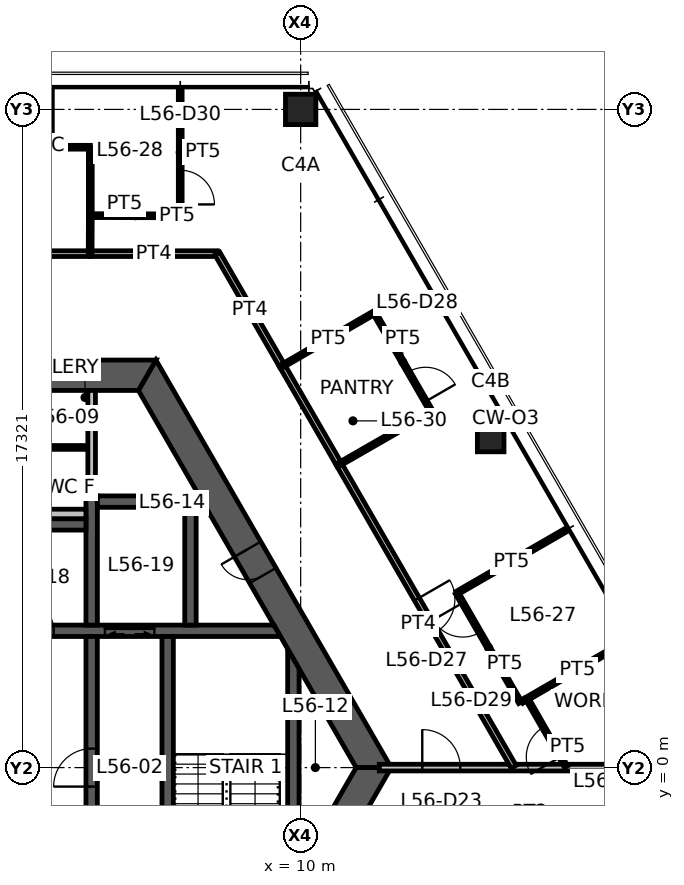
"""IFC4 building model, lengths in metres.
Left out: names, types, materials, properties, quantities, classifications, styles, units other than length and angle.
Written with IfcOpenShell. Run it as: python <this file> out.ifc"""

import sys

from ifc_helpers import new_model, si_unit, direction, frame, frame_2d, origin, origin_2d, place, context, subcontext, project, spatial, polyline, rectangle, hollow_rectangle, outline, extrude, element, fill, save


model = new_model("IFC4")
c1 = context("Model", 3, precision=1e-05, world=origin(), true_north=direction((0.0, 1.0)))
c2 = subcontext(c1, "Body", "Model", "MODEL_VIEW")
j1 = project(units=[si_unit("LENGTHUNIT", "METRE"), si_unit("PLANEANGLEUNIT", "RADIAN")], contexts=[c1])
p1 = place(None, origin())
s1 = spatial("IfcSite", under=j1, at=p1, CompositionType="ELEMENT")
p2 = place(p1, origin())
s2 = spatial("IfcBuilding", under=s1, at=p2, CompositionType="ELEMENT")
p3 = place(p2, frame((0.0, 0.0, 224.5)))
s3 = spatial("IfcBuildingStorey", under=s2, at=p3, CompositionType="ELEMENT", Elevation=224.5)
p4 = place(p3, frame((10.0, 17.321, 0.0), z_axis=(0.0, 0.0, 1.0), x_axis=(1.0, 0.0, 0.0)))
e1 = element("IfcColumn", 1, at=p4, inside=s3, PredefinedType="COLUMN", context=c2, shape_type="SweptSolid", body=[
    extrude(hollow_rectangle(XDim=0.8, YDim=0.8, WallThickness=0.04, at=origin_2d()), origin(), (0.0, 0.0, 1.0), 3.9),
])
p5 = place(p3, frame((15.0, 8.66, 0.0), z_axis=(0.0, 0.0, 1.0), x_axis=(1.0, 0.0, 0.0)))
e2 = element("IfcColumn", 2, at=p5, inside=s3, PredefinedType="COLUMN", context=c2, shape_type="SweptSolid", body=[
    extrude(hollow_rectangle(XDim=0.7, YDim=0.7, WallThickness=0.032, at=origin_2d()), origin(), (0.0, 0.0, 1.0), 3.9),
])
p6 = place(p3, frame((11.922, 0.0, 0.0), z_axis=(0.0, 0.0, 1.0), x_axis=(-0.500004296715, 0.866022923061, 0.0)))
e3 = element("IfcWall", 3, at=p6, inside=s3, PredefinedType="SHEAR", context=c2, shape_type="SweptSolid", body=[
    extrude(outline(polyline([(-0.231, -0.4), (5.835, -0.4), (6.635, -0.4), (12.153, -0.4), (11.691, 0.4), (6.635, 0.4), (5.835, 0.4), (0.231, 0.4), (-0.231, -0.4)])), origin(), (0.0, 0.0, 1.0), 3.9),
])
p7 = place(p6, frame((5.835, 0.0, 0.0)))
e4 = element("IfcOpeningElement", 4, at=p7, cuts=e3, PredefinedType="OPENING", context=c2, shape_type="SweptSolid", body=[
    extrude(rectangle(XDim=0.8, YDim=2.1, at=frame_2d((0.4, 1.05))), frame((0.0, 0.41, 0.0), z_axis=(0.0, -1.0, 0.0), x_axis=(1.0, 0.0, 0.0)), (0.0, 0.0, 1.0), 0.82),
])
p8 = place(p3, frame((5.961, 10.325, 0.0), z_axis=(0.0, 0.0, 1.0), x_axis=(-1.0, 0.0, 0.0)))
e5 = element("IfcWall", 5, at=p8, inside=s3, PredefinedType="SHEAR", context=c2, shape_type="SweptSolid", body=[
    extrude(outline(polyline([(-0.231, -0.4), (4.636, -0.4), (5.536, -0.4), (6.386, -0.4), (7.286, -0.4), (12.153, -0.4), (11.691, 0.4), (7.286, 0.4), (6.386, 0.4), (5.536, 0.4), (4.636, 0.4), (0.231, 0.4), (-0.231, -0.4)])), origin(), (0.0, 0.0, 1.0), 3.9),
])
p9 = place(p8, frame((6.386, 0.0, 0.0)))
e6 = element("IfcOpeningElement", 6, at=p9, cuts=e5, PredefinedType="OPENING", context=c2, shape_type="SweptSolid", body=[
    extrude(rectangle(XDim=0.9, YDim=2.1, at=frame_2d((0.45, 1.05))), frame((0.0, 0.41, 0.0), z_axis=(0.0, -1.0, 0.0), x_axis=(1.0, 0.0, 0.0)), (0.0, 0.0, 1.0), 0.82),
])
p10 = place(p8, frame((4.636, 0.0, 0.0)))
e7 = element("IfcOpeningElement", 7, at=p10, cuts=e5, PredefinedType="OPENING", context=c2, shape_type="SweptSolid", body=[
    extrude(rectangle(XDim=0.9, YDim=2.1, at=frame_2d((0.45, 1.05))), frame((0.0, 0.41, 0.0), z_axis=(0.0, -1.0, 0.0), x_axis=(1.0, 0.0, 0.0)), (0.0, 0.0, 1.0), 0.82),
])
p11 = place(p3, frame((5.961, -10.325, 0.0), z_axis=(0.0, 0.0, 1.0), x_axis=(0.500004296715, 0.866022923061, 0.0)))
e8 = element("IfcWall", 8, at=p11, inside=s3, PredefinedType="SHEAR", context=c2, shape_type="SweptSolid", body=[
    extrude(outline(polyline([(-0.231, -0.4), (4.594, -0.4), (5.394, -0.4), (12.153, -0.4), (11.691, 0.4), (5.394, 0.4), (4.594, 0.4), (0.231, 0.4), (-0.231, -0.4)])), origin(), (0.0, 0.0, 1.0), 3.9),
])
p12 = place(p11, frame((4.594, 0.0, 0.0)))
e9 = element("IfcOpeningElement", 9, at=p12, cuts=e8, PredefinedType="OPENING", context=c2, shape_type="SweptSolid", body=[
    extrude(rectangle(XDim=0.8, YDim=2.1, at=frame_2d((0.4, 1.05))), frame((0.0, 0.41, 0.0), z_axis=(0.0, -1.0, 0.0), x_axis=(1.0, 0.0, 0.0)), (0.0, 0.0, 1.0), 0.82),
])
p13 = place(p3, frame((1.45, 3.6, 0.0), z_axis=(0.0, 0.0, 1.0), x_axis=(1.0, 0.0, 0.0)))
e10 = element("IfcWall", 10, at=p13, inside=s3, PredefinedType="SHEAR", context=c2, shape_type="SweptSolid", body=[
    extrude(outline(polyline([(0.0, -0.15), (1.15, -0.15), (2.05, -0.15), (3.4, -0.15), (4.7, -0.15), (8.019, -0.15), (7.845, 0.15), (4.7, 0.15), (3.4, 0.15), (2.05, 0.15), (1.15, 0.15), (0.0, 0.15), (0.0, -0.15)])), origin(), (0.0, 0.0, 1.0), 3.9),
])
p14 = place(p13, frame((1.15, 0.0, 0.0)))
e11 = element("IfcOpeningElement", 11, at=p14, cuts=e10, PredefinedType="OPENING", context=c2, shape_type="SweptSolid", body=[
    extrude(rectangle(XDim=0.9, YDim=2.1, at=frame_2d((0.45, 1.05))), frame((0.0, 0.16, 0.0), z_axis=(0.0, -1.0, 0.0), x_axis=(1.0, 0.0, 0.0)), (0.0, 0.0, 1.0), 0.32),
])
p15 = place(p13, frame((3.4, 0.0, 0.0)))
e12 = element("IfcOpeningElement", 12, at=p15, cuts=e10, PredefinedType="OPENING", context=c2, shape_type="SweptSolid", body=[
    extrude(rectangle(XDim=1.3, YDim=2.1, at=frame_2d((0.65, 1.05))), frame((0.0, 0.16, 0.0), z_axis=(0.0, -1.0, 0.0), x_axis=(1.0, 0.0, 0.0)), (0.0, 0.0, 1.0), 0.32),
])
p16 = place(p3, frame((4.5, -3.45, 0.0), z_axis=(0.0, 0.0, 1.0), x_axis=(0.0, 1.0, 0.0)))
e13 = element("IfcWall", 13, at=p16, inside=s3, PredefinedType="SHEAR", context=c2, shape_type="SweptSolid", body=[
    extrude(rectangle(XDim=6.9, YDim=0.3, at=frame_2d((3.45, 0.0))), origin(), (0.0, 0.0, 1.0), 3.9),
])
p17 = place(p16, frame((2.95, 0.0, 0.0)))
e14 = element("IfcOpeningElement", 14, at=p17, cuts=e13, PredefinedType="OPENING", context=c2, shape_type="SweptSolid", body=[
    extrude(rectangle(XDim=1.0, YDim=2.1, at=frame_2d((0.5, 1.05))), frame((0.0, 0.16, 0.0), z_axis=(0.0, -1.0, 0.0), x_axis=(1.0, 0.0, 0.0)), (0.0, 0.0, 1.0), 0.32),
])
p18 = place(p3, frame((6.5, -3.45, 0.0), z_axis=(0.0, 0.0, 1.0), x_axis=(0.0, 1.0, 0.0)))
e15 = element("IfcWall", 15, at=p18, inside=s3, PredefinedType="SHEAR", context=c2, shape_type="SweptSolid", body=[
    extrude(rectangle(XDim=6.9, YDim=0.3, at=frame_2d((3.45, 0.0))), origin(), (0.0, 0.0, 1.0), 3.9),
])
p19 = place(p18, frame((0.1, 0.0, 0.0)))
e16 = element("IfcOpeningElement", 16, at=p19, cuts=e15, PredefinedType="OPENING", context=c2, shape_type="SweptSolid", body=[
    extrude(rectangle(XDim=1.0, YDim=2.1, at=frame_2d((0.5, 1.05))), frame((0.0, 0.16, 0.0), z_axis=(0.0, -1.0, 0.0), x_axis=(1.0, 0.0, 0.0)), (0.0, 0.0, 1.0), 0.32),
])
p20 = place(p3, frame((4.5, 3.75, 0.0), z_axis=(0.0, 0.0, 1.0), x_axis=(0.0, 1.0, 0.0)))
e17 = element("IfcWall", 17, at=p20, inside=s3, PredefinedType="SHEAR", context=c2, shape_type="SweptSolid", body=[
    extrude(rectangle(XDim=3.4, YDim=0.3, at=frame_2d((1.7, 0.0))), origin(), (0.0, 0.0, 1.0), 3.9),
])
for number, where, z_axis, x_axis in (
    (18, (1.75, 6.4, 0.0), (0.0, 0.0, 1.0), (1.0, 0.0, 0.0)),
    (19, (4.65, 7.0, 0.0), (0.0, 0.0, 1.0), (1.0, 0.0, 0.0)),
):
    element("IfcWall", number, at=place(p3, frame(where, z_axis=z_axis, x_axis=x_axis)), inside=s3, PredefinedType="SHEAR", context=c2, shape_type="SweptSolid", body=[
        extrude(rectangle(XDim=2.6, YDim=0.3, at=frame_2d((1.3, 0.0))), origin(), (0.0, 0.0, 1.0), 3.9),
    ])
p21 = place(p3, frame((7.1, 3.75, 0.0), z_axis=(0.0, 0.0, 1.0), x_axis=(0.0, 1.0, 0.0)))
e20 = element("IfcWall", 20, at=p21, inside=s3, PredefinedType="SHEAR", context=c2, shape_type="SweptSolid", body=[
    extrude(rectangle(XDim=3.1, YDim=0.3, at=frame_2d((1.55, 0.0))), origin(), (0.0, 0.0, 1.0), 3.9),
])
p22 = place(p3, frame((9.808, -2.862, 0.0), z_axis=(0.0, 0.0, 1.0), x_axis=(0.0, 1.0, 0.0)))
e21 = element("IfcWall", 21, at=p22, inside=s3, PredefinedType="SHEAR", context=c2, shape_type="SweptSolid", body=[
    extrude(outline(polyline([(0.26, -0.15), (5.465, -0.15), (5.984, 0.15), (-0.26, 0.15), (0.26, -0.15)])), origin(), (0.0, 0.0, 1.0), 3.9),
])
p23 = place(p3, frame((4.5, 7.15, 0.0), z_axis=(0.0, 0.0, 1.0), x_axis=(0.0, 1.0, 0.0)))
e22 = element("IfcWall", 22, at=p23, inside=s3, PredefinedType="STANDARD", context=c2, shape_type="SweptSolid", body=[
    extrude(rectangle(XDim=2.775, YDim=0.2, at=frame_2d((1.388, 0.0))), origin(), (0.0, 0.0, 1.0), 3.9),
])
p24 = place(p3, frame((1.75, 6.675, 0.0), z_axis=(0.0, 0.0, 1.0), x_axis=(1.0, 0.0, 0.0)))
e23 = element("IfcWall", 23, at=p24, inside=s3, PredefinedType="PLUMBINGWALL", context=c2, shape_type="SweptSolid", body=[
    extrude(rectangle(XDim=2.6, YDim=0.25, at=frame_2d((1.3, 0.0))), origin(), (0.0, 0.0, 1.0), 3.9),
])
p25 = place(p3, frame((3.3, 8.425, 0.0), z_axis=(0.0, 0.0, 1.0), x_axis=(1.0, 0.0, 0.0)))
e24 = element("IfcWall", 24, at=p25, inside=s3, PredefinedType="PARTITIONING", context=c2, shape_type="SweptSolid", body=[
    extrude(rectangle(XDim=1.05, YDim=0.1, at=frame_2d((0.525, 0.0))), origin(), (0.0, 0.0, 1.0), 2.95),
])
p26 = place(p3, frame((12.07, 0.0, 0.0), z_axis=(0.0, 0.0, 1.0), x_axis=(1.0, 0.0, 0.0)))
e25 = element("IfcWall", 25, at=p26, inside=s3, PredefinedType="PARTITIONING", context=c2, shape_type="SweptSolid", body=[
    extrude(rectangle(XDim=7.93, YDim=0.175, at=frame_2d((3.965, 0.0))), origin(), (0.0, 0.0, 1.0), 3.05),
])
p27 = place(p26, frame((1.13, 0.0, 0.0)))
e26 = element("IfcOpeningElement", 26, at=p27, cuts=e25, PredefinedType="OPENING", context=c2, shape_type="SweptSolid", body=[
    extrude(rectangle(XDim=1.0, YDim=2.1, at=frame_2d((0.5, 1.05))), frame((0.0, 0.098, 0.0), z_axis=(0.0, -1.0, 0.0), x_axis=(1.0, 0.0, 0.0)), (0.0, 0.0, 1.0), 0.195),
])
p28 = place(p3, frame((0.32, 13.525, 0.0), z_axis=(0.0, 0.0, 1.0), x_axis=(1.0, 0.0, 0.0)))
e27 = element("IfcWall", 27, at=p28, inside=s3, PredefinedType="PARTITIONING", context=c2, shape_type="SweptSolid", body=[
    extrude(rectangle(XDim=4.15, YDim=0.15, at=frame_2d((2.075, 0.0))), origin(), (0.0, 0.0, 1.0), 2.95),
])
p29 = place(p28, frame((1.575, 0.0, 0.0)))
e28 = element("IfcOpeningElement", 28, at=p29, cuts=e27, PredefinedType="OPENING", context=c2, shape_type="SweptSolid", body=[
    extrude(rectangle(XDim=1.0, YDim=2.1, at=frame_2d((0.5, 1.05))), frame((0.0, 0.085, 0.0), z_axis=(0.0, -1.0, 0.0), x_axis=(1.0, 0.0, 0.0)), (0.0, 0.0, 1.0), 0.17),
])
p30 = place(p3, frame((9.51, 10.577, 0.0), z_axis=(0.0, 0.0, 1.0), x_axis=(0.499977562641, -0.866038357612, 0.0)))
e29 = element("IfcWall", 29, at=p30, inside=s3, PredefinedType="PARTITIONING", context=c2, shape_type="SweptSolid", body=[
    extrude(rectangle(XDim=3.01, YDim=0.15, at=frame_2d((1.505, 0.0))), origin(), (0.0, 0.0, 1.0), 2.95),
])
p31 = place(p3, frame((4.46, 13.525, 0.0), z_axis=(0.0, 0.0, 1.0), x_axis=(1.0, 0.0, 0.0)))
e30 = element("IfcWall", 30, at=p31, inside=s3, PredefinedType="PARTITIONING", context=c2, shape_type="SweptSolid", body=[
    extrude(rectangle(XDim=3.348, YDim=0.15, at=frame_2d((1.674, 0.0))), origin(), (0.0, 0.0, 1.0), 2.95),
])
p32 = place(p3, frame((7.809, 13.525, 0.0), z_axis=(0.0, 0.0, 1.0), x_axis=(0.500001088571, -0.866024775297, 0.0)))
e31 = element("IfcWall", 31, at=p32, inside=s3, PredefinedType="PARTITIONING", context=c2, shape_type="SweptSolid", body=[
    extrude(rectangle(XDim=3.413, YDim=0.15, at=frame_2d((1.707, 0.0))), origin(), (0.0, 0.0, 1.0), 2.95),
])
p33 = place(p3, frame((11.011, 7.979, 0.0), z_axis=(0.0, 0.0, 1.0), x_axis=(0.49999917462, -0.866025880317, 0.0)))
e32 = element("IfcWall", 32, at=p33, inside=s3, PredefinedType="PARTITIONING", context=c2, shape_type="SweptSolid", body=[
    extrude(rectangle(XDim=9.19, YDim=0.15, at=frame_2d((4.595, 0.0))), origin(), (0.0, 0.0, 1.0), 2.95),
])
p34 = place(p33, frame((4.095, 0.0, 0.0)))
e33 = element("IfcOpeningElement", 33, at=p34, cuts=e32, PredefinedType="OPENING", context=c2, shape_type="SweptSolid", body=[
    extrude(rectangle(XDim=1.0, YDim=2.1, at=frame_2d((0.5, 1.05))), frame((0.0, 0.085, 0.0), z_axis=(0.0, -1.0, 0.0), x_axis=(1.0, 0.0, 0.0)), (0.0, 0.0, 1.0), 0.17),
])
p35 = place(p3, frame((3.415, 16.325, 0.0), z_axis=(0.0, 0.0, 1.0), x_axis=(1.0, 0.0, 0.0)))
e34 = element("IfcWall", 34, at=p35, inside=s3, PredefinedType="PARTITIONING", context=c2, shape_type="SweptSolid", body=[
    extrude(rectangle(XDim=1.05, YDim=0.1, at=frame_2d((0.525, 0.0))), origin(), (0.0, 0.0, 1.0), 2.95),
])
p36 = place(p3, frame((4.465, 16.325, 0.0), z_axis=(0.0, 0.0, 1.0), x_axis=(0.0, -1.0, 0.0)))
e35 = element("IfcWall", 35, at=p36, inside=s3, PredefinedType="PARTITIONING", context=c2, shape_type="SweptSolid", body=[
    extrude(rectangle(XDim=1.81, YDim=0.1, at=frame_2d((0.905, 0.0))), origin(), (0.0, 0.0, 1.0), 2.95),
])
p37 = place(p3, frame((4.465, 14.525, 0.0), z_axis=(0.0, 0.0, 1.0), x_axis=(-0.00463862197, -0.999989241535, 0.0)))
e36 = element("IfcWall", 36, at=p37, inside=s3, PredefinedType="PARTITIONING", context=c2, shape_type="SweptSolid", body=[
    extrude(rectangle(XDim=1.0, YDim=0.1, at=frame_2d((0.5, 0.0))), origin(), (0.0, 0.0, 1.0), 2.95),
])
p38 = place(p3, frame((9.515, 10.569, 0.0), z_axis=(0.0, 0.0, 1.0), x_axis=(0.865255114713, 0.501331812737, 0.0)))
e37 = element("IfcWall", 37, at=p38, inside=s3, PredefinedType="PARTITIONING", context=c2, shape_type="SweptSolid", body=[
    extrude(rectangle(XDim=2.8, YDim=0.1, at=frame_2d((1.4, 0.0))), origin(), (0.0, 0.0, 1.0), 2.95),
])
p39 = place(p3, frame((11.938, 11.973, 0.0), z_axis=(0.0, 0.0, 1.0), x_axis=(0.50002537861, -0.866010750942, 0.0)))
e38 = element("IfcWall", 38, at=p39, inside=s3, PredefinedType="PARTITIONING", context=c2, shape_type="SweptSolid", body=[
    extrude(rectangle(XDim=3.0, YDim=0.1, at=frame_2d((1.5, 0.0))), origin(), (0.0, 0.0, 1.0), 2.95),
])
p40 = place(p39, frame((1.8, 0.0, 0.0)))
e39 = element("IfcOpeningElement", 39, at=p40, cuts=e38, PredefinedType="OPENING", context=c2, shape_type="SweptSolid", body=[
    extrude(rectangle(XDim=0.9, YDim=2.1, at=frame_2d((0.45, 1.05))), frame((0.0, 0.06, 0.0), z_axis=(0.0, -1.0, 0.0), x_axis=(1.0, 0.0, 0.0)), (0.0, 0.0, 1.0), 0.12),
])
p41 = place(p3, frame((13.438, 9.375, 0.0), z_axis=(0.0, 0.0, 1.0), x_axis=(-0.866817750494, -0.498625097071, 0.0)))
e40 = element("IfcWall", 40, at=p41, inside=s3, PredefinedType="PARTITIONING", context=c2, shape_type="SweptSolid", body=[
    extrude(rectangle(XDim=2.8, YDim=0.1, at=frame_2d((1.4, 0.0))), origin(), (0.0, 0.0, 1.0), 2.95),
])
p42 = place(p3, frame((18.62, 3.351, 0.0), z_axis=(0.0, 0.0, 1.0), x_axis=(-0.866043267704, -0.499969057507, 0.0)))
e41 = element("IfcWall", 41, at=p42, inside=s3, PredefinedType="PARTITIONING", context=c2, shape_type="SweptSolid", body=[
    extrude(rectangle(XDim=3.085, YDim=0.1, at=frame_2d((1.542, 0.0))), origin(), (0.0, 0.0, 1.0), 2.95),
])
p43 = place(p3, frame((14.114, 4.595, 0.0), z_axis=(0.0, 0.0, 1.0), x_axis=(0.866033287653, 0.49998634449, 0.0)))
e42 = element("IfcWall", 42, at=p43, inside=s3, PredefinedType="PARTITIONING", context=c2, shape_type="SweptSolid", body=[
    extrude(rectangle(XDim=3.31, YDim=0.1, at=frame_2d((1.655, 0.0))), origin(), (0.0, 0.0, 1.0), 2.95),
])
p44 = place(p3, frame((15.779, 1.71, 0.0), z_axis=(0.0, 0.0, 1.0), x_axis=(-0.500001606164, 0.866024476463, 0.0)))
e43 = element("IfcWall", 43, at=p44, inside=s3, PredefinedType="PARTITIONING", context=c2, shape_type="SweptSolid", body=[
    extrude(rectangle(XDim=3.331, YDim=0.1, at=frame_2d((1.666, 0.0))), origin(), (0.0, 0.0, 1.0), 2.95),
])
p45 = place(p44, frame((2.131, 0.0, 0.0)))
e44 = element("IfcOpeningElement", 44, at=p45, cuts=e43, PredefinedType="OPENING", context=c2, shape_type="SweptSolid", body=[
    extrude(rectangle(XDim=0.9, YDim=2.1, at=frame_2d((0.45, 1.05))), frame((0.0, 0.06, 0.0), z_axis=(0.0, -1.0, 0.0), x_axis=(1.0, 0.0, 0.0)), (0.0, 0.0, 1.0), 0.12),
])
p46 = place(p3, frame((6.831, 14.521, 0.0), z_axis=(0.0, 0.0, 1.0), x_axis=(-0.999998274693, 0.001857581934, 0.0)))
e45 = element("IfcWall", 45, at=p46, inside=s3, PredefinedType="PARTITIONING", context=c2, shape_type="SweptSolid", body=[
    extrude(rectangle(XDim=2.366, YDim=0.1, at=frame_2d((1.183, 0.0))), origin(), (0.0, 0.0, 1.0), 2.95),
])
p47 = place(p3, frame((6.831, 17.855, 0.0), z_axis=(0.0, 0.0, 1.0), x_axis=(0.0, -1.0, 0.0)))
e46 = element("IfcWall", 46, at=p47, inside=s3, PredefinedType="PARTITIONING", context=c2, shape_type="SweptSolid", body=[
    extrude(rectangle(XDim=3.335, YDim=0.1, at=frame_2d((1.667, 0.0))), origin(), (0.0, 0.0, 1.0), 2.95),
])
p48 = place(p47, frame((2.135, 0.0, 0.0)))
e47 = element("IfcOpeningElement", 47, at=p48, cuts=e46, PredefinedType="OPENING", context=c2, shape_type="SweptSolid", body=[
    extrude(rectangle(XDim=0.9, YDim=2.1, at=frame_2d((0.45, 1.05))), frame((0.0, 0.06, 0.0), z_axis=(0.0, -1.0, 0.0), x_axis=(1.0, 0.0, 0.0)), (0.0, 0.0, 1.0), 0.12),
])
p49 = place(p3, frame((16.986, 0.02, 0.0), z_axis=(0.0, 0.0, 1.0), x_axis=(-0.498096123952, 0.867121820337, 0.0)))
e48 = element("IfcWall", 48, at=p49, inside=s3, PredefinedType="PARTITIONING", context=c2, shape_type="SweptSolid", body=[
    extrude(rectangle(XDim=2.067, YDim=0.1, at=frame_2d((1.034, 0.0))), origin(), (0.0, 0.0, 1.0), 2.95),
])
p50 = place(p49, frame((0.3, 0.0, 0.0)))
e49 = element("IfcOpeningElement", 49, at=p50, cuts=e48, PredefinedType="OPENING", context=c2, shape_type="SweptSolid", body=[
    extrude(rectangle(XDim=0.9, YDim=2.1, at=frame_2d((0.45, 1.05))), frame((0.0, 0.06, 0.0), z_axis=(0.0, -1.0, 0.0), x_axis=(1.0, 0.0, 0.0)), (0.0, 0.0, 1.0), 0.12),
])
p51 = place(p3, frame((15.823, 1.735, 0.0), z_axis=(0.0, 0.0, 1.0), x_axis=(0.867234405398, 0.497900076415, 0.0)))
e50 = element("IfcWall", 50, at=p51, inside=s3, PredefinedType="PARTITIONING", context=c2, shape_type="SweptSolid", body=[
    extrude(rectangle(XDim=0.104, YDim=0.1, at=frame_2d((0.052, 0.0))), origin(), (0.0, 0.0, 1.0), 2.95),
])
p52 = place(p7, origin())
e51 = element("IfcDoor", 51, at=p52, inside=s3, OperationType="SINGLE_SWING_RIGHT", PredefinedType="DOOR", context=c2, shape_type="SweptSolid", body=[
    extrude(rectangle(XDim=0.8, YDim=2.1, at=frame_2d((0.4, 1.05))), frame((0.0, 0.025, 0.0), z_axis=(0.0, -1.0, 0.0), x_axis=(1.0, 0.0, 0.0)), (0.0, 0.0, 1.0), 0.05),
])
fill(e4, e51)
p53 = place(p17, origin())
e52 = element("IfcDoor", 52, at=p53, inside=s3, OperationType="SINGLE_SWING_LEFT", PredefinedType="DOOR", context=c2, shape_type="SweptSolid", body=[
    extrude(rectangle(XDim=1.0, YDim=2.1, at=frame_2d((0.5, 1.05))), frame((0.0, 0.025, 0.0), z_axis=(0.0, -1.0, 0.0), x_axis=(1.0, 0.0, 0.0)), (0.0, 0.0, 1.0), 0.05),
])
fill(e14, e52)
p54 = place(p14, origin())
e53 = element("IfcDoor", 53, at=p54, inside=s3, OperationType="SINGLE_SWING_LEFT", PredefinedType="DOOR", context=c2, shape_type="SweptSolid", body=[
    extrude(rectangle(XDim=0.9, YDim=2.1, at=frame_2d((0.45, 1.05))), frame((0.0, 0.025, 0.0), z_axis=(0.0, -1.0, 0.0), x_axis=(1.0, 0.0, 0.0)), (0.0, 0.0, 1.0), 0.05),
])
fill(e11, e53)
p55 = place(p27, origin())
e54 = element("IfcDoor", 54, at=p55, inside=s3, OperationType="SINGLE_SWING_LEFT", PredefinedType="DOOR", context=c2, shape_type="SweptSolid", body=[
    extrude(rectangle(XDim=1.0, YDim=2.1, at=frame_2d((0.5, 1.05))), frame((0.0, 0.025, 0.0), z_axis=(0.0, -1.0, 0.0), x_axis=(1.0, 0.0, 0.0)), (0.0, 0.0, 1.0), 0.05),
])
fill(e26, e54)
p56 = place(p34, origin())
e55 = element("IfcDoor", 55, at=p56, inside=s3, OperationType="SINGLE_SWING_LEFT", PredefinedType="DOOR", context=c2, shape_type="SweptSolid", body=[
    extrude(rectangle(XDim=1.0, YDim=2.1, at=frame_2d((0.5, 1.05))), frame((0.0, 0.025, 0.0), z_axis=(0.0, -1.0, 0.0), x_axis=(1.0, 0.0, 0.0)), (0.0, 0.0, 1.0), 0.05),
])
fill(e33, e55)
p57 = place(p40, origin())
e56 = element("IfcDoor", 56, at=p57, inside=s3, OperationType="SINGLE_SWING_RIGHT", PredefinedType="DOOR", context=c2, shape_type="SweptSolid", body=[
    extrude(rectangle(XDim=0.9, YDim=2.1, at=frame_2d((0.45, 1.05))), frame((0.0, 0.025, 0.0), z_axis=(0.0, -1.0, 0.0), x_axis=(1.0, 0.0, 0.0)), (0.0, 0.0, 1.0), 0.05),
])
fill(e39, e56)
p58 = place(p45, origin())
e57 = element("IfcDoor", 57, at=p58, inside=s3, OperationType="SINGLE_SWING_RIGHT", PredefinedType="DOOR", context=c2, shape_type="SweptSolid", body=[
    extrude(rectangle(XDim=0.9, YDim=2.1, at=frame_2d((0.45, 1.05))), frame((0.0, 0.025, 0.0), z_axis=(0.0, -1.0, 0.0), x_axis=(1.0, 0.0, 0.0)), (0.0, 0.0, 1.0), 0.05),
])
fill(e44, e57)
p59 = place(p48, origin())
e58 = element("IfcDoor", 58, at=p59, inside=s3, OperationType="SINGLE_SWING_RIGHT", PredefinedType="DOOR", context=c2, shape_type="SweptSolid", body=[
    extrude(rectangle(XDim=0.9, YDim=2.1, at=frame_2d((0.45, 1.05))), frame((0.0, 0.025, 0.0), z_axis=(0.0, -1.0, 0.0), x_axis=(1.0, 0.0, 0.0)), (0.0, 0.0, 1.0), 0.05),
])
fill(e47, e58)
p60 = place(p50, origin())
e59 = element("IfcDoor", 59, at=p60, inside=s3, OperationType="SINGLE_SWING_LEFT", PredefinedType="DOOR", context=c2, shape_type="SweptSolid", body=[
    extrude(rectangle(XDim=0.9, YDim=2.1, at=frame_2d((0.45, 1.05))), frame((0.0, 0.025, 0.0), z_axis=(0.0, -1.0, 0.0), x_axis=(1.0, 0.0, 0.0)), (0.0, 0.0, 1.0), 0.05),
])
fill(e49, e59)
p61 = place(p15, origin())
e60 = element("IfcDoor", 60, at=p61, inside=s3, OperationType="DOUBLE_DOOR_SLIDING", PredefinedType="DOOR", context=c2, shape_type="SweptSolid", body=[
    extrude(rectangle(XDim=1.3, YDim=2.1, at=frame_2d((0.65, 1.05))), frame((0.0, 0.025, 0.0), z_axis=(0.0, -1.0, 0.0), x_axis=(1.0, 0.0, 0.0)), (0.0, 0.0, 1.0), 0.05),
])
fill(e12, e60)
save(model, sys.argv[1])
